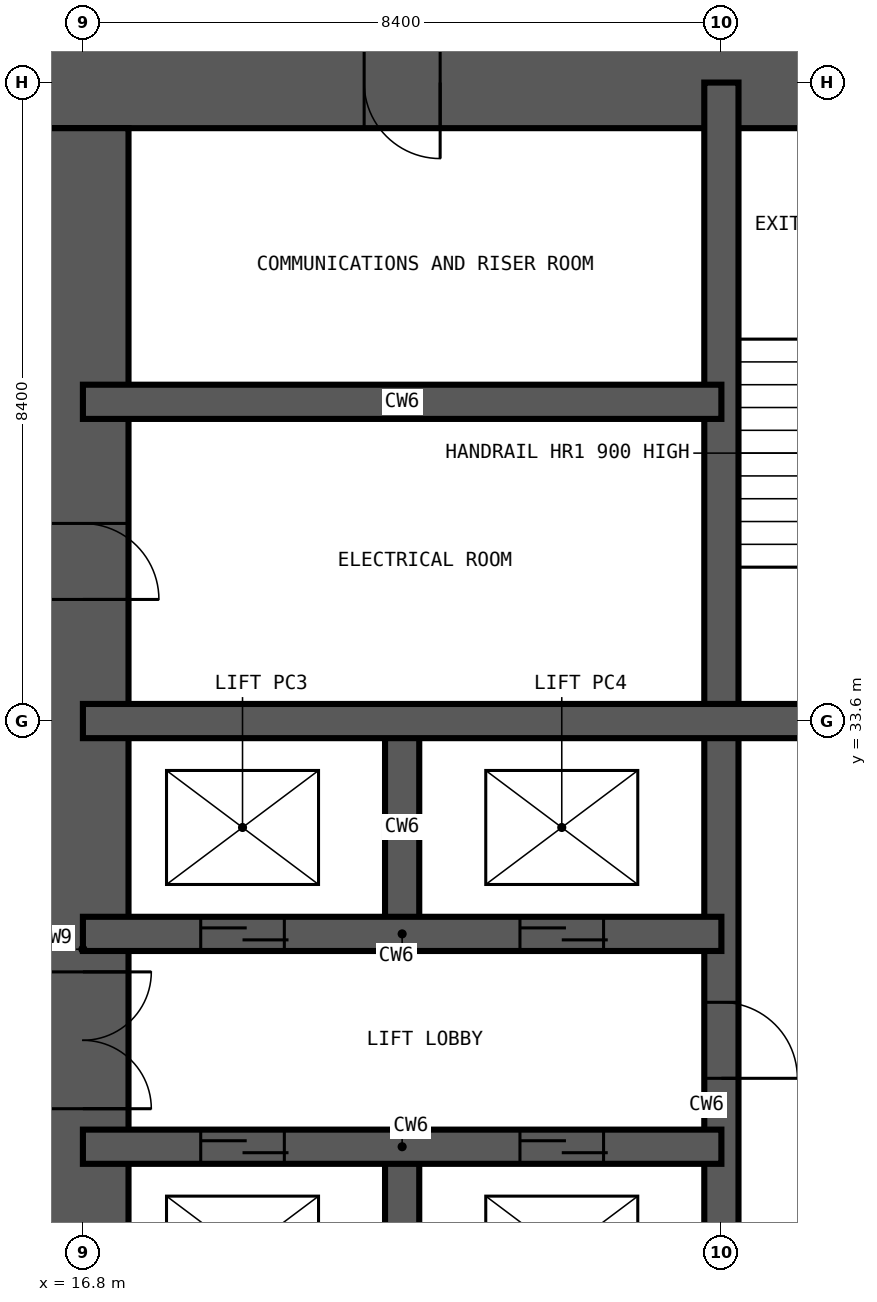
"""IFC4 building model, lengths in metres.
Left out: names, types, materials, properties, quantities, classifications, styles, units other than length and angle.
Written with IfcOpenShell. Run it as: python <this file> out.ifc"""

import sys

from ifc_helpers import new_model, si_unit, direction, frame, frame_2d, origin, place, context, subcontext, project, spatial, rectangle, extrude, element, fill, save


model = new_model("IFC4")
c1 = context("Model", 3, precision=1e-05, world=origin(), true_north=direction((0.0, 1.0)))
c2 = subcontext(c1, "Body", "Model", "MODEL_VIEW")
j1 = project(units=[si_unit("LENGTHUNIT", "METRE"), si_unit("PLANEANGLEUNIT", "RADIAN")], contexts=[c1])
p1 = place(None, origin())
s1 = spatial("IfcSite", under=j1, at=p1, CompositionType="ELEMENT")
p2 = place(p1, origin())
s2 = spatial("IfcBuilding", under=s1, at=p2, CompositionType="ELEMENT")
p3 = place(p2, frame((0.0, 0.0, 93.6)))
s3 = spatial("IfcBuildingStorey", under=s2, at=p3, CompositionType="ELEMENT", Elevation=93.6)
p4 = place(p3, frame((42.6, 42.0, -0.35), z_axis=(0.0, 0.0, 1.0), x_axis=(-1.0, 0.0, 0.0)))
e1 = element("IfcWall", 1, at=p4, inside=s3, PredefinedType="SHEAR", context=c2, shape_type="SweptSolid", body=[
    extrude(rectangle(XDim=26.4, YDim=1.2, at=frame_2d((13.2, 0.0))), origin(), (0.0, 0.0, 1.0), 3.6),
])
p5 = place(p4, frame((21.1, 0.0, 0.35)))
e2 = element("IfcOpeningElement", 2, at=p5, cuts=e1, PredefinedType="OPENING", context=c2, shape_type="SweptSolid", body=[
    extrude(rectangle(XDim=1.0, YDim=2.1, at=frame_2d((0.5, 1.05))), frame((0.0, 0.61, 0.0), z_axis=(0.0, -1.0, 0.0), x_axis=(1.0, 0.0, 0.0)), (0.0, 0.0, 1.0), 1.22),
])
p6 = place(p4, frame((10.5, 0.0, 0.35)))
e3 = element("IfcOpeningElement", 3, at=p6, cuts=e1, PredefinedType="OPENING", context=c2, shape_type="SweptSolid", body=[
    extrude(rectangle(XDim=1.2, YDim=2.2, at=frame_2d((0.6, 1.1))), frame((0.0, 0.61, 0.0), z_axis=(0.0, -1.0, 0.0), x_axis=(1.0, 0.0, 0.0)), (0.0, 0.0, 1.0), 1.22),
])
p7 = place(p3, frame((16.8, 41.4, -0.35), z_axis=(0.0, 0.0, 1.0), x_axis=(0.0, -1.0, 0.0)))
e4 = element("IfcWall", 4, at=p7, inside=s3, PredefinedType="SHEAR", context=c2, shape_type="SweptSolid", body=[
    extrude(rectangle(XDim=24.0, YDim=1.2, at=frame_2d((12.0, 0.0))), origin(), (0.0, 0.0, 1.0), 3.6),
])
p8 = place(p7, frame((11.1, 0.0, 0.35)))
e5 = element("IfcOpeningElement", 5, at=p8, cuts=e4, PredefinedType="OPENING", context=c2, shape_type="SweptSolid", body=[
    extrude(rectangle(XDim=1.8, YDim=2.2, at=frame_2d((0.9, 1.1))), frame((0.0, 0.61, 0.0), z_axis=(0.0, -1.0, 0.0), x_axis=(1.0, 0.0, 0.0)), (0.0, 0.0, 1.0), 1.22),
])
p9 = place(p7, frame((19.9, 0.0, 0.35)))
e6 = element("IfcOpeningElement", 6, at=p9, cuts=e4, PredefinedType="OPENING", context=c2, shape_type="SweptSolid", body=[
    extrude(rectangle(XDim=1.0, YDim=2.1, at=frame_2d((0.5, 1.05))), frame((0.0, 0.61, 0.0), z_axis=(0.0, -1.0, 0.0), x_axis=(1.0, 0.0, 0.0)), (0.0, 0.0, 1.0), 1.22),
])
p10 = place(p7, frame((5.2, 0.0, 0.35)))
e7 = element("IfcOpeningElement", 7, at=p10, cuts=e4, PredefinedType="OPENING", context=c2, shape_type="SweptSolid", body=[
    extrude(rectangle(XDim=1.0, YDim=2.1, at=frame_2d((0.5, 1.05))), frame((0.0, 0.61, 0.0), z_axis=(0.0, -1.0, 0.0), x_axis=(1.0, 0.0, 0.0)), (0.0, 0.0, 1.0), 1.22),
])
p11 = place(p3, frame((21.0, 22.4, -0.35), z_axis=(0.0, 0.0, 1.0), x_axis=(0.0, 1.0, 0.0)))
e8 = element("IfcWall", 8, at=p11, inside=s3, PredefinedType="SHEAR", context=c2, shape_type="SweptSolid", body=[
    extrude(rectangle(XDim=5.6, YDim=0.45, at=frame_2d((2.8, 0.0))), origin(), (0.0, 0.0, 1.0), 3.6),
])
p12 = place(p3, frame((21.0, 30.8, -0.35), z_axis=(0.0, 0.0, 1.0), x_axis=(0.0, 1.0, 0.0)))
e9 = element("IfcWall", 9, at=p12, inside=s3, PredefinedType="SHEAR", context=c2, shape_type="SweptSolid", body=[
    extrude(rectangle(XDim=2.8, YDim=0.45, at=frame_2d((1.4, 0.0))), origin(), (0.0, 0.0, 1.0), 3.6),
])
p13 = place(p3, frame((25.2, 16.8, -0.35), z_axis=(0.0, 0.0, 1.0), x_axis=(0.0, 1.0, 0.0)))
e10 = element("IfcWall", 10, at=p13, inside=s3, PredefinedType="SHEAR", context=c2, shape_type="SweptSolid", body=[
    extrude(rectangle(XDim=25.2, YDim=0.45, at=frame_2d((12.6, 0.0))), origin(), (0.0, 0.0, 1.0), 3.6),
])
p14 = place(p13, frame((12.1, 0.0, 0.35)))
e11 = element("IfcOpeningElement", 11, at=p14, cuts=e10, PredefinedType="OPENING", context=c2, shape_type="SweptSolid", body=[
    extrude(rectangle(XDim=1.0, YDim=2.1, at=frame_2d((0.5, 1.05))), frame((0.0, 0.235, 0.0), z_axis=(0.0, -1.0, 0.0), x_axis=(1.0, 0.0, 0.0)), (0.0, 0.0, 1.0), 0.47),
])
p15 = place(p3, frame((16.8, 28.0, -0.35), z_axis=(0.0, 0.0, 1.0), x_axis=(1.0, 0.0, 0.0)))
e12 = element("IfcWall", 12, at=p15, inside=s3, PredefinedType="SHEAR", context=c2, shape_type="SweptSolid", body=[
    extrude(rectangle(XDim=8.4, YDim=0.45, at=frame_2d((4.2, 0.0))), origin(), (0.0, 0.0, 1.0), 3.6),
])
p16 = place(p15, frame((1.55, 0.0, 0.35)))
e13 = element("IfcOpeningElement", 13, at=p16, cuts=e12, PredefinedType="OPENING", context=c2, shape_type="SweptSolid", body=[
    extrude(rectangle(XDim=1.1, YDim=2.2, at=frame_2d((0.55, 1.1))), frame((0.0, 0.235, 0.0), z_axis=(0.0, -1.0, 0.0), x_axis=(1.0, 0.0, 0.0)), (0.0, 0.0, 1.0), 0.47),
])
p17 = place(p15, frame((5.75, 0.0, 0.35)))
e14 = element("IfcOpeningElement", 14, at=p17, cuts=e12, PredefinedType="OPENING", context=c2, shape_type="SweptSolid", body=[
    extrude(rectangle(XDim=1.1, YDim=2.2, at=frame_2d((0.55, 1.1))), frame((0.0, 0.235, 0.0), z_axis=(0.0, -1.0, 0.0), x_axis=(1.0, 0.0, 0.0)), (0.0, 0.0, 1.0), 0.47),
])
p18 = place(p3, frame((16.8, 30.8, -0.35), z_axis=(0.0, 0.0, 1.0), x_axis=(1.0, 0.0, 0.0)))
e15 = element("IfcWall", 15, at=p18, inside=s3, PredefinedType="SHEAR", context=c2, shape_type="SweptSolid", body=[
    extrude(rectangle(XDim=8.4, YDim=0.45, at=frame_2d((4.2, 0.0))), origin(), (0.0, 0.0, 1.0), 3.6),
])
p19 = place(p18, frame((1.55, 0.0, 0.35)))
e16 = element("IfcOpeningElement", 16, at=p19, cuts=e15, PredefinedType="OPENING", context=c2, shape_type="SweptSolid", body=[
    extrude(rectangle(XDim=1.1, YDim=2.2, at=frame_2d((0.55, 1.1))), frame((0.0, 0.235, 0.0), z_axis=(0.0, -1.0, 0.0), x_axis=(1.0, 0.0, 0.0)), (0.0, 0.0, 1.0), 0.47),
])
p20 = place(p18, frame((5.75, 0.0, 0.35)))
e17 = element("IfcOpeningElement", 17, at=p20, cuts=e15, PredefinedType="OPENING", context=c2, shape_type="SweptSolid", body=[
    extrude(rectangle(XDim=1.1, YDim=2.2, at=frame_2d((0.55, 1.1))), frame((0.0, 0.235, 0.0), z_axis=(0.0, -1.0, 0.0), x_axis=(1.0, 0.0, 0.0)), (0.0, 0.0, 1.0), 0.47),
])
p21 = place(p3, frame((16.8, 33.6, -0.35), z_axis=(0.0, 0.0, 1.0), x_axis=(1.0, 0.0, 0.0)))
e18 = element("IfcWall", 18, at=p21, inside=s3, PredefinedType="SHEAR", context=c2, shape_type="SweptSolid", body=[
    extrude(rectangle(XDim=25.2, YDim=0.45, at=frame_2d((12.6, 0.0))), origin(), (0.0, 0.0, 1.0), 3.6),
])
p22 = place(p21, frame((23.3, 0.0, 0.35)))
e19 = element("IfcOpeningElement", 19, at=p22, cuts=e18, PredefinedType="OPENING", context=c2, shape_type="SweptSolid", body=[
    extrude(rectangle(XDim=1.0, YDim=2.1, at=frame_2d((0.5, 1.05))), frame((0.0, 0.235, 0.0), z_axis=(0.0, -1.0, 0.0), x_axis=(1.0, 0.0, 0.0)), (0.0, 0.0, 1.0), 0.47),
])
p23 = place(p3, frame((16.8, 37.8, -0.35), z_axis=(0.0, 0.0, 1.0), x_axis=(1.0, 0.0, 0.0)))
e20 = element("IfcWall", 20, at=p23, inside=s3, PredefinedType="SHEAR", context=c2, shape_type="SweptSolid", body=[
    extrude(rectangle(XDim=8.4, YDim=0.45, at=frame_2d((4.2, 0.0))), origin(), (0.0, 0.0, 1.0), 3.6),
])
p24 = place(p16, origin())
e21 = element("IfcDoor", 21, at=p24, inside=s3, OperationType="DOUBLE_DOOR_SLIDING", PredefinedType="DOOR", context=c2, shape_type="SweptSolid", body=[
    extrude(rectangle(XDim=1.1, YDim=2.2, at=frame_2d((0.55, 1.1))), frame((0.0, 0.025, 0.0), z_axis=(0.0, -1.0, 0.0), x_axis=(1.0, 0.0, 0.0)), (0.0, 0.0, 1.0), 0.05),
])
fill(e13, e21)
p25 = place(p17, origin())
e22 = element("IfcDoor", 22, at=p25, inside=s3, OperationType="DOUBLE_DOOR_SLIDING", PredefinedType="DOOR", context=c2, shape_type="SweptSolid", body=[
    extrude(rectangle(XDim=1.1, YDim=2.2, at=frame_2d((0.55, 1.1))), frame((0.0, 0.025, 0.0), z_axis=(0.0, -1.0, 0.0), x_axis=(1.0, 0.0, 0.0)), (0.0, 0.0, 1.0), 0.05),
])
fill(e14, e22)
p26 = place(p19, origin())
e23 = element("IfcDoor", 23, at=p26, inside=s3, OperationType="DOUBLE_DOOR_SLIDING", PredefinedType="DOOR", context=c2, shape_type="SweptSolid", body=[
    extrude(rectangle(XDim=1.1, YDim=2.2, at=frame_2d((0.55, 1.1))), frame((0.0, 0.025, 0.0), z_axis=(0.0, -1.0, 0.0), x_axis=(1.0, 0.0, 0.0)), (0.0, 0.0, 1.0), 0.05),
])
fill(e16, e23)
p27 = place(p20, origin())
e24 = element("IfcDoor", 24, at=p27, inside=s3, OperationType="DOUBLE_DOOR_SLIDING", PredefinedType="DOOR", context=c2, shape_type="SweptSolid", body=[
    extrude(rectangle(XDim=1.1, YDim=2.2, at=frame_2d((0.55, 1.1))), frame((0.0, 0.025, 0.0), z_axis=(0.0, -1.0, 0.0), x_axis=(1.0, 0.0, 0.0)), (0.0, 0.0, 1.0), 0.05),
])
fill(e17, e24)
p28 = place(p8, origin())
e25 = element("IfcDoor", 25, at=p28, inside=s3, OperationType="DOUBLE_DOOR_DOUBLE_SWING", PredefinedType="DOOR", context=c2, shape_type="SweptSolid", body=[
    extrude(rectangle(XDim=1.8, YDim=2.2, at=frame_2d((0.9, 1.1))), frame((0.0, 0.025, 0.0), z_axis=(0.0, -1.0, 0.0), x_axis=(1.0, 0.0, 0.0)), (0.0, 0.0, 1.0), 0.05),
])
fill(e5, e25)
p29 = place(p10, origin())
e26 = element("IfcDoor", 26, at=p29, inside=s3, OperationType="SINGLE_SWING_RIGHT", PredefinedType="DOOR", context=c2, shape_type="SweptSolid", body=[
    extrude(rectangle(XDim=1.0, YDim=2.1, at=frame_2d((0.5, 1.05))), frame((0.0, 0.025, 0.0), z_axis=(0.0, -1.0, 0.0), x_axis=(1.0, 0.0, 0.0)), (0.0, 0.0, 1.0), 0.05),
])
fill(e7, e26)
p30 = place(p5, origin())
e27 = element("IfcDoor", 27, at=p30, inside=s3, OperationType="SINGLE_SWING_LEFT", PredefinedType="DOOR", context=c2, shape_type="SweptSolid", body=[
    extrude(rectangle(XDim=1.0, YDim=2.1, at=frame_2d((0.5, 1.05))), frame((0.0, 0.025, 0.0), z_axis=(0.0, -1.0, 0.0), x_axis=(1.0, 0.0, 0.0)), (0.0, 0.0, 1.0), 0.05),
])
fill(e2, e27)
p31 = place(p14, frame((1.0, 0.0, 0.0), z_axis=(0.0, 0.0, 1.0), x_axis=(-1.0, 0.0, 0.0)))
e28 = element("IfcDoor", 28, at=p31, inside=s3, OperationType="SINGLE_SWING_RIGHT", PredefinedType="DOOR", context=c2, shape_type="SweptSolid", body=[
    extrude(rectangle(XDim=1.0, YDim=2.1, at=frame_2d((0.5, 1.05))), frame((0.0, 0.025, 0.0), z_axis=(0.0, -1.0, 0.0), x_axis=(1.0, 0.0, 0.0)), (0.0, 0.0, 1.0), 0.05),
])
fill(e11, e28)
save(model, sys.argv[1])
